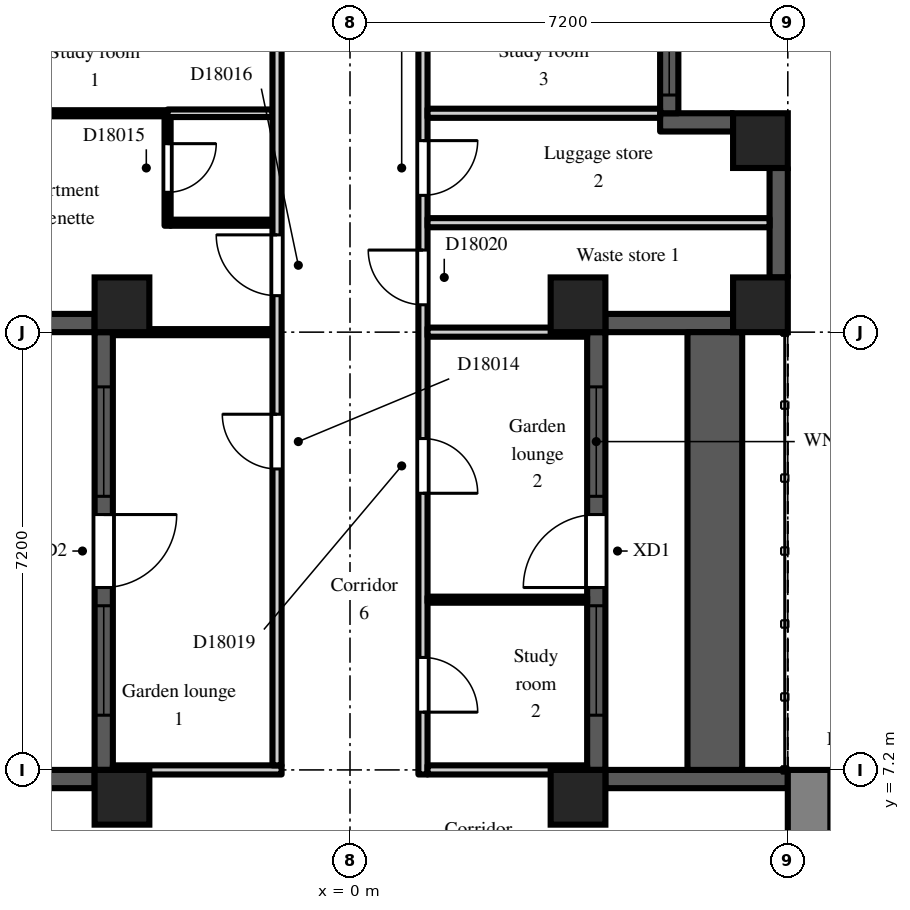
"""IFC4 building model, lengths in metres.
Left out: names, types, materials, properties, quantities, classifications, styles, units other than length and angle.
Written with IfcOpenShell. Run it as: python <this file> out.ifc"""

import sys

from ifc_helpers import new_model, si_unit, direction, frame, frame_2d, origin, origin_2d, place, context, subcontext, project, spatial, rectangle, extrude, element, fill, save


model = new_model("IFC4")
c1 = context("Model", 3, precision=1e-05, world=origin(), true_north=direction((0.0, 1.0)))
c2 = subcontext(c1, "Body", "Model", "MODEL_VIEW")
j1 = project(units=[si_unit("LENGTHUNIT", "METRE"), si_unit("PLANEANGLEUNIT", "RADIAN")], contexts=[c1])
p1 = place(None, origin())
s1 = spatial("IfcSite", under=j1, at=p1, CompositionType="ELEMENT")
p2 = place(p1, origin())
s2 = spatial("IfcBuilding", under=s1, at=p2, CompositionType="ELEMENT")
p3 = place(p2, frame((0.0, 0.0, 120.3)))
s3 = spatial("IfcBuildingStorey", under=s2, at=p3, CompositionType="ELEMENT", Elevation=120.3)
for number, where, z_axis, x_axis in (
    (1, (-3.75, 6.75, 0.0), (0.0, 0.0, 1.0), (1.0, 0.0, 0.0)),
    (2, (-3.75, 14.85, 0.0), (0.0, 0.0, 1.0), (1.0, 0.0, 0.0)),
    (3, (3.75, 6.75, 0.0), (0.0, 0.0, 1.0), (1.0, 0.0, 0.0)),
    (4, (3.75, 14.85, 0.0), (0.0, 0.0, 1.0), (1.0, 0.0, 0.0)),
    (5, (6.75, 14.85, 0.0), (0.0, 0.0, 1.0), (1.0, 0.0, 0.0)),
    (6, (6.75, 17.55, 0.0), (0.0, 0.0, 1.0), (1.0, 0.0, 0.0)),
):
    element("IfcColumn", number, at=place(p3, frame(where, z_axis=z_axis, x_axis=x_axis)), inside=s3, PredefinedType="COLUMN", context=c2, shape_type="SweptSolid", body=[
        extrude(rectangle(XDim=0.9, YDim=0.9, at=origin_2d()), origin(), (0.0, 0.0, 1.0), 3.0),
    ])
p4 = place(p3, frame((7.2, 7.05, 0.0), z_axis=(0.0, 0.0, 1.0), x_axis=(-1.0, 0.0, 0.0)))
e7 = element("IfcWall", 7, at=p4, inside=s3, PredefinedType="SOLIDWALL", context=c2, shape_type="SweptSolid", body=[
    extrude(rectangle(XDim=3.0, YDim=0.3, at=frame_2d((1.5, 0.0))), origin(), (0.0, 0.0, 1.0), 2.2),
])
p5 = place(p3, frame((4.05, 7.2, 0.0), z_axis=(0.0, 0.0, 1.0), x_axis=(0.0, 1.0, 0.0)))
e8 = element("IfcWall", 8, at=p5, inside=s3, PredefinedType="SOLIDWALL", context=c2, shape_type="SweptSolid", body=[
    extrude(rectangle(XDim=7.2, YDim=0.3, at=frame_2d((3.6, 0.0))), origin(), (0.0, 0.0, 1.0), 2.2),
])
p6 = place(p5, frame((3.0, 0.0, 0.0)))
e9 = element("IfcOpeningElement", 9, at=p6, cuts=e8, PredefinedType="OPENING", context=c2, shape_type="SweptSolid", body=[
    extrude(rectangle(XDim=1.2, YDim=2.05, at=frame_2d((0.6, 1.025))), frame((0.0, 0.16, 0.0), z_axis=(0.0, -1.0, 0.0), x_axis=(1.0, 0.0, 0.0)), (0.0, 0.0, 1.0), 0.32),
])
p7 = place(p5, frame((0.9, 0.0, 0.2)))
e10 = element("IfcOpeningElement", 10, at=p7, cuts=e8, PredefinedType="OPENING", context=c2, shape_type="SweptSolid", body=[
    extrude(rectangle(XDim=1.8, YDim=1.85, at=frame_2d((0.9, 0.925))), frame((0.0, 0.16, 0.0), z_axis=(0.0, -1.0, 0.0), x_axis=(1.0, 0.0, 0.0)), (0.0, 0.0, 1.0), 0.32),
])
p8 = place(p5, frame((4.5, 0.0, 0.2)))
e11 = element("IfcOpeningElement", 11, at=p8, cuts=e8, PredefinedType="OPENING", context=c2, shape_type="SweptSolid", body=[
    extrude(rectangle(XDim=1.8, YDim=1.85, at=frame_2d((0.9, 0.925))), frame((0.0, 0.16, 0.0), z_axis=(0.0, -1.0, 0.0), x_axis=(1.0, 0.0, 0.0)), (0.0, 0.0, 1.0), 0.32),
])
p9 = place(p3, frame((4.2, 14.55, 0.0), z_axis=(0.0, 0.0, 1.0), x_axis=(1.0, 0.0, 0.0)))
e12 = element("IfcWall", 12, at=p9, inside=s3, PredefinedType="SOLIDWALL", context=c2, shape_type="SweptSolid", body=[
    extrude(rectangle(XDim=2.1, YDim=0.3, at=frame_2d((1.05, 0.0))), origin(), (0.0, 0.0, 1.0), 2.2),
])
p10 = place(p3, frame((7.05, 15.3, 0.0), z_axis=(0.0, 0.0, 1.0), x_axis=(0.0, 1.0, 0.0)))
e13 = element("IfcWall", 13, at=p10, inside=s3, PredefinedType="SOLIDWALL", context=c2, shape_type="SweptSolid", body=[
    extrude(rectangle(XDim=1.8, YDim=0.3, at=frame_2d((0.9, 0.0))), origin(), (0.0, 0.0, 1.0), 2.2),
])
p11 = place(p3, frame((6.3, 17.85, 0.0), z_axis=(0.0, 0.0, 1.0), x_axis=(-1.0, 0.0, 0.0)))
e14 = element("IfcWall", 14, at=p11, inside=s3, PredefinedType="SOLIDWALL", context=c2, shape_type="SweptSolid", body=[
    extrude(rectangle(XDim=1.2, YDim=0.3, at=frame_2d((0.6, 0.0))), origin(), (0.0, 0.0, 1.0), 2.6),
])
p12 = place(p3, frame((5.25, 18.0, 0.0), z_axis=(0.0, 0.0, 1.0), x_axis=(0.0, 1.0, 0.0)))
e15 = element("IfcWall", 15, at=p12, inside=s3, PredefinedType="SOLIDWALL", context=c2, shape_type="SweptSolid", body=[
    extrude(rectangle(XDim=1.8, YDim=0.3, at=frame_2d((0.9, 0.0))), origin(), (0.0, 0.0, 1.0), 2.6),
])
p13 = place(p12, frame((0.3, 0.0, 0.2)))
e16 = element("IfcOpeningElement", 16, at=p13, cuts=e15, PredefinedType="OPENING", context=c2, shape_type="SweptSolid", body=[
    extrude(rectangle(XDim=1.2, YDim=1.85, at=frame_2d((0.6, 0.925))), frame((0.0, 0.16, 0.0), z_axis=(0.0, -1.0, 0.0), x_axis=(1.0, 0.0, 0.0)), (0.0, 0.0, 1.0), 0.32),
])
p14 = place(p3, frame((-6.3, 14.55, 0.0), z_axis=(0.0, 0.0, 1.0), x_axis=(1.0, 0.0, 0.0)))
e17 = element("IfcWall", 17, at=p14, inside=s3, PredefinedType="SOLIDWALL", context=c2, shape_type="SweptSolid", body=[
    extrude(rectangle(XDim=2.1, YDim=0.3, at=frame_2d((1.05, 0.0))), origin(), (0.0, 0.0, 1.0), 2.2),
])
p15 = place(p3, frame((-4.05, 14.4, 0.0), z_axis=(0.0, 0.0, 1.0), x_axis=(0.0, -1.0, 0.0)))
e18 = element("IfcWall", 18, at=p15, inside=s3, PredefinedType="SOLIDWALL", context=c2, shape_type="SweptSolid", body=[
    extrude(rectangle(XDim=7.2, YDim=0.3, at=frame_2d((3.6, 0.0))), origin(), (0.0, 0.0, 1.0), 2.2),
])
p16 = place(p15, frame((3.0, 0.0, 0.0)))
e19 = element("IfcOpeningElement", 19, at=p16, cuts=e18, PredefinedType="OPENING", context=c2, shape_type="SweptSolid", body=[
    extrude(rectangle(XDim=1.2, YDim=2.05, at=frame_2d((0.6, 1.025))), frame((0.0, 0.16, 0.0), z_axis=(0.0, -1.0, 0.0), x_axis=(1.0, 0.0, 0.0)), (0.0, 0.0, 1.0), 0.32),
])
p17 = place(p15, frame((0.9, 0.0, 0.2)))
e20 = element("IfcOpeningElement", 20, at=p17, cuts=e18, PredefinedType="OPENING", context=c2, shape_type="SweptSolid", body=[
    extrude(rectangle(XDim=1.8, YDim=1.85, at=frame_2d((0.9, 0.925))), frame((0.0, 0.16, 0.0), z_axis=(0.0, -1.0, 0.0), x_axis=(1.0, 0.0, 0.0)), (0.0, 0.0, 1.0), 0.32),
])
p18 = place(p15, frame((4.5, 0.0, 0.2)))
e21 = element("IfcOpeningElement", 21, at=p18, cuts=e18, PredefinedType="OPENING", context=c2, shape_type="SweptSolid", body=[
    extrude(rectangle(XDim=1.8, YDim=1.85, at=frame_2d((0.9, 0.925))), frame((0.0, 0.16, 0.0), z_axis=(0.0, -1.0, 0.0), x_axis=(1.0, 0.0, 0.0)), (0.0, 0.0, 1.0), 0.32),
])
p19 = place(p3, frame((-4.2, 7.05, 0.0), z_axis=(0.0, 0.0, 1.0), x_axis=(-1.0, 0.0, 0.0)))
e22 = element("IfcWall", 22, at=p19, inside=s3, PredefinedType="SOLIDWALL", context=c2, shape_type="SweptSolid", body=[
    extrude(rectangle(XDim=3.0, YDim=0.3, at=frame_2d((1.5, 0.0))), origin(), (0.0, 0.0, 1.0), 2.2),
])
p20 = place(p3, frame((6.0, 7.2, 0.0), z_axis=(0.0, 0.0, 1.0), x_axis=(0.0, 1.0, 0.0)))
e23 = element("IfcWall", 23, at=p20, inside=s3, PredefinedType="PARAPET", context=c2, shape_type="SweptSolid", body=[
    extrude(rectangle(XDim=7.2, YDim=0.9, at=frame_2d((3.6, 0.0))), origin(), (0.0, 0.0, 1.0), 0.8),
])
p21 = place(p3, frame((7.55, -7.2, 0.0), z_axis=(0.0, 0.0, 1.0), x_axis=(0.0, 1.0, 0.0)))
e24 = element("IfcWall", 24, at=p21, inside=s3, PredefinedType="SHEAR", context=c2, shape_type="SweptSolid", body=[
    extrude(rectangle(XDim=14.4, YDim=0.7, at=frame_2d((7.2, 0.0))), origin(), (0.0, 0.0, 1.0), 2.6),
])
p22 = place(p21, frame((6.0, 0.0, 0.0)))
e25 = element("IfcOpeningElement", 25, at=p22, cuts=e24, PredefinedType="OPENING", context=c2, shape_type="SweptSolid", body=[
    extrude(rectangle(XDim=2.4, YDim=2.2, at=frame_2d((1.2, 1.1))), frame((0.0, 0.36, 0.0), z_axis=(0.0, -1.0, 0.0), x_axis=(1.0, 0.0, 0.0)), (0.0, 0.0, 1.0), 0.72),
])
p23 = place(p3, frame((-5.1, 18.0, 0.0), z_axis=(0.0, 0.0, 1.0), x_axis=(1.0, 0.0, 0.0)))
e26 = element("IfcWall", 26, at=p23, inside=s3, PredefinedType="PARTITIONING", context=c2, shape_type="SweptSolid", body=[
    extrude(rectangle(XDim=2.1, YDim=0.1, at=frame_2d((1.05, 0.0))), origin(), (0.0, 0.0, 1.0), 2.6),
])
p24 = place(p3, frame((-3.9, 7.2, 0.0), z_axis=(0.0, 0.0, 1.0), x_axis=(1.0, 0.0, 0.0)))
e27 = element("IfcWall", 27, at=p24, inside=s3, PredefinedType="PARTITIONING", context=c2, shape_type="SweptSolid", body=[
    extrude(rectangle(XDim=2.775, YDim=0.15, at=frame_2d((1.387, 0.0))), origin(), (0.0, 0.0, 1.0), 2.6),
])
p25 = place(p3, frame((-3.9, 14.4, 0.0), z_axis=(0.0, 0.0, 1.0), x_axis=(1.0, 0.0, 0.0)))
e28 = element("IfcWall", 28, at=p25, inside=s3, PredefinedType="PARTITIONING", context=c2, shape_type="SweptSolid", body=[
    extrude(rectangle(XDim=2.625, YDim=0.1, at=frame_2d((1.312, 0.0))), origin(), (0.0, 0.0, 1.0), 2.6),
])
p26 = place(p3, frame((-3.0, 16.15, 0.0), z_axis=(0.0, 0.0, 1.0), x_axis=(0.0, 1.0, 0.0)))
e29 = element("IfcWall", 29, at=p26, inside=s3, PredefinedType="PARTITIONING", context=c2, shape_type="SweptSolid", body=[
    extrude(rectangle(XDim=1.788, YDim=0.1, at=frame_2d((0.894, 0.0))), origin(), (0.0, 0.0, 1.0), 2.6),
])
p27 = place(p26, frame((0.55, 0.0, 0.0)))
e30 = element("IfcOpeningElement", 30, at=p27, cuts=e29, PredefinedType="OPENING", context=c2, shape_type="SweptSolid", body=[
    extrude(rectangle(XDim=0.8, YDim=2.1, at=frame_2d((0.4, 1.05))), frame((0.0, 0.06, 0.0), z_axis=(0.0, -1.0, 0.0), x_axis=(1.0, 0.0, 0.0)), (0.0, 0.0, 1.0), 0.12),
])
p28 = place(p3, frame((-2.95, 16.2, 0.0), z_axis=(0.0, 0.0, 1.0), x_axis=(1.0, 0.0, 0.0)))
e31 = element("IfcWall", 31, at=p28, inside=s3, PredefinedType="PARTITIONING", context=c2, shape_type="SweptSolid", body=[
    extrude(rectangle(XDim=1.675, YDim=0.1, at=frame_2d((0.837, 0.0))), origin(), (0.0, 0.0, 1.0), 2.6),
])
p29 = place(p3, frame((-3.0, 18.0, 0.0), z_axis=(0.0, 0.0, 1.0), x_axis=(1.0, 0.0, 0.0)))
e32 = element("IfcWall", 32, at=p29, inside=s3, PredefinedType="PARTITIONING", context=c2, shape_type="SweptSolid", body=[
    extrude(rectangle(XDim=1.725, YDim=0.125, at=frame_2d((0.863, 0.0))), origin(), (0.0, 0.0, 1.0), 2.6),
])
p30 = place(p3, frame((-1.2, 7.275, 0.0), z_axis=(0.0, 0.0, 1.0), x_axis=(0.0, 1.0, 0.0)))
e33 = element("IfcWall", 33, at=p30, inside=s3, PredefinedType="PARTITIONING", context=c2, shape_type="SweptSolid", body=[
    extrude(rectangle(XDim=14.025, YDim=0.15, at=frame_2d((7.013, 0.0))), origin(), (0.0, 0.0, 1.0), 2.6),
])
p31 = place(p30, frame((4.875, 0.0, 0.0)))
e34 = element("IfcOpeningElement", 34, at=p31, cuts=e33, PredefinedType="OPENING", context=c2, shape_type="SweptSolid", body=[
    extrude(rectangle(XDim=0.9, YDim=2.1, at=frame_2d((0.45, 1.05))), frame((0.0, 0.085, 0.0), z_axis=(0.0, -1.0, 0.0), x_axis=(1.0, 0.0, 0.0)), (0.0, 0.0, 1.0), 0.17),
])
p32 = place(p30, frame((7.725, 0.0, 0.0)))
e35 = element("IfcOpeningElement", 35, at=p32, cuts=e33, PredefinedType="OPENING", context=c2, shape_type="SweptSolid", body=[
    extrude(rectangle(XDim=1.0, YDim=2.1, at=frame_2d((0.5, 1.05))), frame((0.0, 0.085, 0.0), z_axis=(0.0, -1.0, 0.0), x_axis=(1.0, 0.0, 0.0)), (0.0, 0.0, 1.0), 0.17),
])
p33 = place(p30, frame((11.925, 0.0, 0.0)))
e36 = element("IfcOpeningElement", 36, at=p33, cuts=e33, PredefinedType="OPENING", context=c2, shape_type="SweptSolid", body=[
    extrude(rectangle(XDim=0.9, YDim=2.1, at=frame_2d((0.45, 1.05))), frame((0.0, 0.085, 0.0), z_axis=(0.0, -1.0, 0.0), x_axis=(1.0, 0.0, 0.0)), (0.0, 0.0, 1.0), 0.17),
])
p34 = place(p3, frame((1.2, 7.125, 0.0), z_axis=(0.0, 0.0, 1.0), x_axis=(0.0, 1.0, 0.0)))
e37 = element("IfcWall", 37, at=p34, inside=s3, PredefinedType="PARTITIONING", context=c2, shape_type="SweptSolid", body=[
    extrude(rectangle(XDim=14.175, YDim=0.15, at=frame_2d((7.087, 0.0))), origin(), (0.0, 0.0, 1.0), 2.6),
])
p35 = place(p34, frame((1.025, 0.0, 0.0)))
e38 = element("IfcOpeningElement", 38, at=p35, cuts=e37, PredefinedType="OPENING", context=c2, shape_type="SweptSolid", body=[
    extrude(rectangle(XDim=0.9, YDim=2.1, at=frame_2d((0.45, 1.05))), frame((0.0, 0.085, 0.0), z_axis=(0.0, -1.0, 0.0), x_axis=(1.0, 0.0, 0.0)), (0.0, 0.0, 1.0), 0.17),
])
p36 = place(p34, frame((4.625, 0.0, 0.0)))
e39 = element("IfcOpeningElement", 39, at=p36, cuts=e37, PredefinedType="OPENING", context=c2, shape_type="SweptSolid", body=[
    extrude(rectangle(XDim=0.9, YDim=2.1, at=frame_2d((0.45, 1.05))), frame((0.0, 0.085, 0.0), z_axis=(0.0, -1.0, 0.0), x_axis=(1.0, 0.0, 0.0)), (0.0, 0.0, 1.0), 0.17),
])
p37 = place(p34, frame((7.725, 0.0, 0.0)))
e40 = element("IfcOpeningElement", 40, at=p37, cuts=e37, PredefinedType="OPENING", context=c2, shape_type="SweptSolid", body=[
    extrude(rectangle(XDim=0.9, YDim=2.1, at=frame_2d((0.45, 1.05))), frame((0.0, 0.085, 0.0), z_axis=(0.0, -1.0, 0.0), x_axis=(1.0, 0.0, 0.0)), (0.0, 0.0, 1.0), 0.17),
])
p38 = place(p34, frame((9.525, 0.0, 0.0)))
e41 = element("IfcOpeningElement", 41, at=p38, cuts=e37, PredefinedType="OPENING", context=c2, shape_type="SweptSolid", body=[
    extrude(rectangle(XDim=0.9, YDim=2.1, at=frame_2d((0.45, 1.05))), frame((0.0, 0.085, 0.0), z_axis=(0.0, -1.0, 0.0), x_axis=(1.0, 0.0, 0.0)), (0.0, 0.0, 1.0), 0.17),
])
p39 = place(p34, frame((12.075, 0.0, 0.0)))
e42 = element("IfcOpeningElement", 42, at=p39, cuts=e37, PredefinedType="OPENING", context=c2, shape_type="SweptSolid", body=[
    extrude(rectangle(XDim=0.9, YDim=2.1, at=frame_2d((0.45, 1.05))), frame((0.0, 0.085, 0.0), z_axis=(0.0, -1.0, 0.0), x_axis=(1.0, 0.0, 0.0)), (0.0, 0.0, 1.0), 0.17),
])
p40 = place(p3, frame((1.275, 7.2, 0.0), z_axis=(0.0, 0.0, 1.0), x_axis=(1.0, 0.0, 0.0)))
e43 = element("IfcWall", 43, at=p40, inside=s3, PredefinedType="PARTITIONING", context=c2, shape_type="SweptSolid", body=[
    extrude(rectangle(XDim=2.625, YDim=0.15, at=frame_2d((1.312, 0.0))), origin(), (0.0, 0.0, 1.0), 2.6),
])
p41 = place(p3, frame((1.275, 10.0, 0.0), z_axis=(0.0, 0.0, 1.0), x_axis=(1.0, 0.0, 0.0)))
e44 = element("IfcWall", 44, at=p41, inside=s3, PredefinedType="PARTITIONING", context=c2, shape_type="SweptSolid", body=[
    extrude(rectangle(XDim=2.625, YDim=0.1, at=frame_2d((1.312, 0.0))), origin(), (0.0, 0.0, 1.0), 2.6),
])
p42 = place(p3, frame((1.275, 14.4, 0.0), z_axis=(0.0, 0.0, 1.0), x_axis=(1.0, 0.0, 0.0)))
e45 = element("IfcWall", 45, at=p42, inside=s3, PredefinedType="PARTITIONING", context=c2, shape_type="SweptSolid", body=[
    extrude(rectangle(XDim=2.625, YDim=0.15, at=frame_2d((1.312, 0.0))), origin(), (0.0, 0.0, 1.0), 2.6),
])
p43 = place(p3, frame((1.275, 16.2, 0.0), z_axis=(0.0, 0.0, 1.0), x_axis=(1.0, 0.0, 0.0)))
e46 = element("IfcWall", 46, at=p43, inside=s3, PredefinedType="PARTITIONING", context=c2, shape_type="SweptSolid", body=[
    extrude(rectangle(XDim=5.625, YDim=0.15, at=frame_2d((2.812, 0.0))), origin(), (0.0, 0.0, 1.0), 2.6),
])
p44 = place(p3, frame((1.275, 18.0, 0.0), z_axis=(0.0, 0.0, 1.0), x_axis=(1.0, 0.0, 0.0)))
e47 = element("IfcWall", 47, at=p44, inside=s3, PredefinedType="PARTITIONING", context=c2, shape_type="SweptSolid", body=[
    extrude(rectangle(XDim=3.825, YDim=0.15, at=frame_2d((1.913, 0.0))), origin(), (0.0, 0.0, 1.0), 2.6),
])
p45 = place(p6, origin())
e48 = element("IfcDoor", 48, at=p45, inside=s3, OperationType="SINGLE_SWING_LEFT", PredefinedType="DOOR", context=c2, shape_type="SweptSolid", body=[
    extrude(rectangle(XDim=1.2, YDim=2.05, at=frame_2d((0.6, 1.025))), frame((0.0, 0.025, 0.0), z_axis=(0.0, -1.0, 0.0), x_axis=(1.0, 0.0, 0.0)), (0.0, 0.0, 1.0), 0.05),
])
fill(e9, e48)
p46 = place(p7, origin())
e49 = element("IfcWindow", 49, at=p46, inside=s3, PartitioningType="SINGLE_PANEL", PredefinedType="WINDOW", context=c2, shape_type="SweptSolid", body=[
    extrude(rectangle(XDim=1.8, YDim=1.85, at=frame_2d((0.9, 0.925))), frame((0.0, 0.03, 0.0), z_axis=(0.0, -1.0, 0.0), x_axis=(1.0, 0.0, 0.0)), (0.0, 0.0, 1.0), 0.06),
])
fill(e10, e49)
p47 = place(p8, origin())
e50 = element("IfcWindow", 50, at=p47, inside=s3, PartitioningType="SINGLE_PANEL", PredefinedType="WINDOW", context=c2, shape_type="SweptSolid", body=[
    extrude(rectangle(XDim=1.8, YDim=1.85, at=frame_2d((0.9, 0.925))), frame((0.0, 0.03, 0.0), z_axis=(0.0, -1.0, 0.0), x_axis=(1.0, 0.0, 0.0)), (0.0, 0.0, 1.0), 0.06),
])
fill(e11, e50)
p48 = place(p13, origin())
e51 = element("IfcWindow", 51, at=p48, inside=s3, PartitioningType="SINGLE_PANEL", PredefinedType="WINDOW", context=c2, shape_type="SweptSolid", body=[
    extrude(rectangle(XDim=1.2, YDim=1.85, at=frame_2d((0.6, 0.925))), frame((0.0, 0.03, 0.0), z_axis=(0.0, -1.0, 0.0), x_axis=(1.0, 0.0, 0.0)), (0.0, 0.0, 1.0), 0.06),
])
fill(e16, e51)
p49 = place(p16, origin())
e52 = element("IfcDoor", 52, at=p49, inside=s3, OperationType="SINGLE_SWING_LEFT", PredefinedType="DOOR", context=c2, shape_type="SweptSolid", body=[
    extrude(rectangle(XDim=1.2, YDim=2.05, at=frame_2d((0.6, 1.025))), frame((0.0, 0.025, 0.0), z_axis=(0.0, -1.0, 0.0), x_axis=(1.0, 0.0, 0.0)), (0.0, 0.0, 1.0), 0.05),
])
fill(e19, e52)
p50 = place(p17, origin())
e53 = element("IfcWindow", 53, at=p50, inside=s3, PartitioningType="SINGLE_PANEL", PredefinedType="WINDOW", context=c2, shape_type="SweptSolid", body=[
    extrude(rectangle(XDim=1.8, YDim=1.85, at=frame_2d((0.9, 0.925))), frame((0.0, 0.03, 0.0), z_axis=(0.0, -1.0, 0.0), x_axis=(1.0, 0.0, 0.0)), (0.0, 0.0, 1.0), 0.06),
])
fill(e20, e53)
p51 = place(p18, origin())
e54 = element("IfcWindow", 54, at=p51, inside=s3, PartitioningType="SINGLE_PANEL", PredefinedType="WINDOW", context=c2, shape_type="SweptSolid", body=[
    extrude(rectangle(XDim=1.8, YDim=1.85, at=frame_2d((0.9, 0.925))), frame((0.0, 0.03, 0.0), z_axis=(0.0, -1.0, 0.0), x_axis=(1.0, 0.0, 0.0)), (0.0, 0.0, 1.0), 0.06),
])
fill(e21, e54)
p52 = place(p31, origin())
e55 = element("IfcDoor", 55, at=p52, inside=s3, OperationType="SINGLE_SWING_RIGHT", PredefinedType="DOOR", context=c2, shape_type="SweptSolid", body=[
    extrude(rectangle(XDim=0.9, YDim=2.1, at=frame_2d((0.45, 1.05))), frame((0.0, 0.025, 0.0), z_axis=(0.0, -1.0, 0.0), x_axis=(1.0, 0.0, 0.0)), (0.0, 0.0, 1.0), 0.05),
])
fill(e34, e55)
p53 = place(p27, frame((0.8, 0.0, 0.0), z_axis=(0.0, 0.0, 1.0), x_axis=(-1.0, 0.0, 0.0)))
e56 = element("IfcDoor", 56, at=p53, inside=s3, OperationType="SINGLE_SWING_LEFT", PredefinedType="DOOR", context=c2, shape_type="SweptSolid", body=[
    extrude(rectangle(XDim=0.8, YDim=2.1, at=frame_2d((0.4, 1.05))), frame((0.0, 0.025, 0.0), z_axis=(0.0, -1.0, 0.0), x_axis=(1.0, 0.0, 0.0)), (0.0, 0.0, 1.0), 0.05),
])
fill(e30, e56)
p54 = place(p32, origin())
e57 = element("IfcDoor", 57, at=p54, inside=s3, OperationType="SINGLE_SWING_RIGHT", PredefinedType="DOOR", context=c2, shape_type="SweptSolid", body=[
    extrude(rectangle(XDim=1.0, YDim=2.1, at=frame_2d((0.5, 1.05))), frame((0.0, 0.025, 0.0), z_axis=(0.0, -1.0, 0.0), x_axis=(1.0, 0.0, 0.0)), (0.0, 0.0, 1.0), 0.05),
])
fill(e35, e57)
p55 = place(p35, frame((0.9, 0.0, 0.0), z_axis=(0.0, 0.0, 1.0), x_axis=(-1.0, 0.0, 0.0)))
e58 = element("IfcDoor", 58, at=p55, inside=s3, OperationType="SINGLE_SWING_RIGHT", PredefinedType="DOOR", context=c2, shape_type="SweptSolid", body=[
    extrude(rectangle(XDim=0.9, YDim=2.1, at=frame_2d((0.45, 1.05))), frame((0.0, 0.025, 0.0), z_axis=(0.0, -1.0, 0.0), x_axis=(1.0, 0.0, 0.0)), (0.0, 0.0, 1.0), 0.05),
])
fill(e38, e58)
p56 = place(p36, frame((0.9, 0.0, 0.0), z_axis=(0.0, 0.0, 1.0), x_axis=(-1.0, 0.0, 0.0)))
e59 = element("IfcDoor", 59, at=p56, inside=s3, OperationType="SINGLE_SWING_RIGHT", PredefinedType="DOOR", context=c2, shape_type="SweptSolid", body=[
    extrude(rectangle(XDim=0.9, YDim=2.1, at=frame_2d((0.45, 1.05))), frame((0.0, 0.025, 0.0), z_axis=(0.0, -1.0, 0.0), x_axis=(1.0, 0.0, 0.0)), (0.0, 0.0, 1.0), 0.05),
])
fill(e39, e59)
p57 = place(p37, origin())
e60 = element("IfcDoor", 60, at=p57, inside=s3, OperationType="SINGLE_SWING_RIGHT", PredefinedType="DOOR", context=c2, shape_type="SweptSolid", body=[
    extrude(rectangle(XDim=0.9, YDim=2.1, at=frame_2d((0.45, 1.05))), frame((0.0, 0.025, 0.0), z_axis=(0.0, -1.0, 0.0), x_axis=(1.0, 0.0, 0.0)), (0.0, 0.0, 1.0), 0.05),
])
fill(e40, e60)
p58 = place(p38, frame((0.9, 0.0, 0.0), z_axis=(0.0, 0.0, 1.0), x_axis=(-1.0, 0.0, 0.0)))
e61 = element("IfcDoor", 61, at=p58, inside=s3, OperationType="SINGLE_SWING_LEFT", PredefinedType="DOOR", context=c2, shape_type="SweptSolid", body=[
    extrude(rectangle(XDim=0.9, YDim=2.1, at=frame_2d((0.45, 1.05))), frame((0.0, 0.025, 0.0), z_axis=(0.0, -1.0, 0.0), x_axis=(1.0, 0.0, 0.0)), (0.0, 0.0, 1.0), 0.05),
])
fill(e41, e61)
save(model, sys.argv[1])
